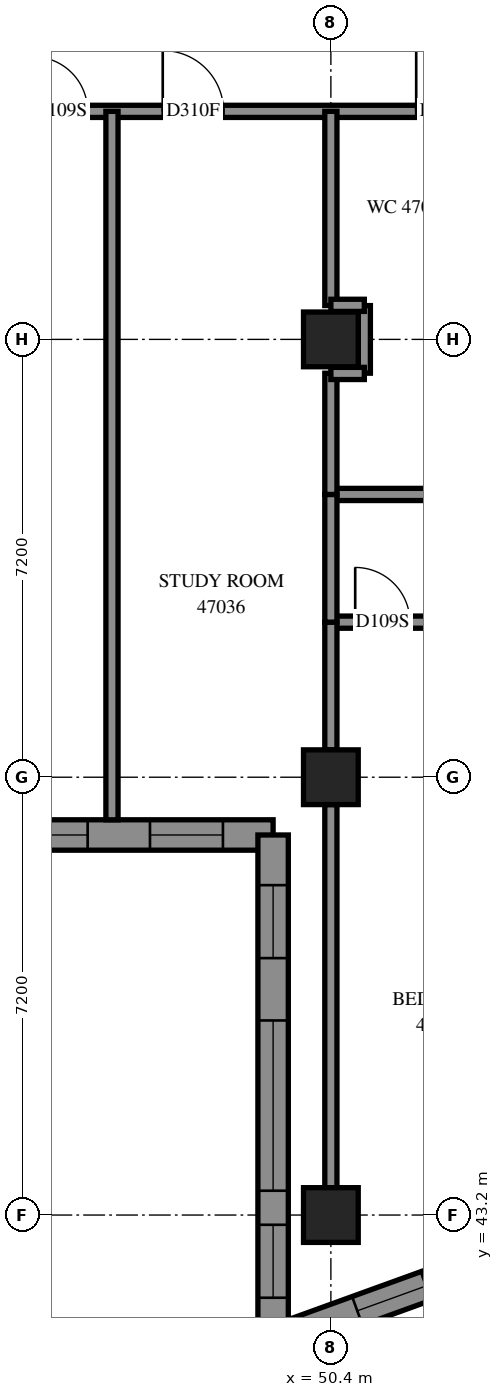
"""IFC4 building model, lengths in metres.
Left out: names, types, materials, properties, quantities, classifications, styles, units other than length and angle.
Written with IfcOpenShell. Run it as: python <this file> out.ifc"""

import sys

from ifc_helpers import new_model, si_unit, direction, frame, frame_2d, origin, origin_2d, place, context, subcontext, project, spatial, polyline, rectangle, outline, extrude, element, fill, save


model = new_model("IFC4")
c1 = context("Model", 3, precision=1e-05, world=origin(), true_north=direction((0.0, 1.0)))
c2 = subcontext(c1, "Body", "Model", "MODEL_VIEW")
j1 = project(units=[si_unit("LENGTHUNIT", "METRE"), si_unit("PLANEANGLEUNIT", "RADIAN")], contexts=[c1])
p1 = place(None, origin())
s1 = spatial("IfcSite", under=j1, at=p1, CompositionType="ELEMENT")
p2 = place(p1, origin())
s2 = spatial("IfcBuilding", under=s1, at=p2, CompositionType="ELEMENT")
p3 = place(p2, frame((0.0, 0.0, 172.8)))
s3 = spatial("IfcBuildingStorey", under=s2, at=p3, CompositionType="ELEMENT", Elevation=172.8)
for number, where, z_axis, x_axis in (
    (1, (50.4, 43.2, 0.0), (0.0, 0.0, 1.0), (1.0, 0.0, 0.0)),
    (2, (50.4, 50.4, 0.0), (0.0, 0.0, 1.0), (1.0, 0.0, 0.0)),
    (3, (50.4, 57.6, 0.0), (0.0, 0.0, 1.0), (1.0, 0.0, 0.0)),
):
    element("IfcColumn", number, at=place(p3, frame(where, z_axis=z_axis, x_axis=x_axis)), inside=s3, PredefinedType="COLUMN", context=c2, shape_type="SweptSolid", body=[
        extrude(rectangle(XDim=0.9, YDim=0.9, at=origin_2d()), origin(), (0.0, 0.0, 1.0), 3.1),
    ])
p4 = place(p3, frame((42.25, 49.45, 0.0), z_axis=(0.0, 0.0, 1.0), x_axis=(1.0, 0.0, 0.0)))
e4 = element("IfcWall", 4, at=p4, inside=s3, PredefinedType="SOLIDWALL", context=c2, shape_type="SweptSolid", body=[
    extrude(outline(polyline([(-0.25, -0.25), (6.95, -0.25), (7.45, 0.25), (0.25, 0.25), (-0.25, -0.25)])), origin(), (0.0, 0.0, 1.0), 3.1),
])
p5 = place(p4, frame((1.35, 0.0, 0.45)))
e5 = element("IfcOpeningElement", 5, at=p5, cuts=e4, PredefinedType="OPENING", context=c2, shape_type="SweptSolid", body=[
    extrude(rectangle(XDim=2.8, YDim=2.5, at=frame_2d((1.4, 1.25))), frame((0.0, 0.26, 0.0), z_axis=(0.0, -1.0, 0.0), x_axis=(1.0, 0.0, 0.0)), (0.0, 0.0, 1.0), 0.52),
])
p6 = place(p4, frame((5.175, 0.0, 0.45)))
e6 = element("IfcOpeningElement", 6, at=p6, cuts=e4, PredefinedType="OPENING", context=c2, shape_type="SweptSolid", body=[
    extrude(rectangle(XDim=1.2, YDim=2.5, at=frame_2d((0.6, 1.25))), frame((0.0, 0.26, 0.0), z_axis=(0.0, -1.0, 0.0), x_axis=(1.0, 0.0, 0.0)), (0.0, 0.0, 1.0), 0.52),
])
p7 = place(p3, frame((49.45, 49.45, 0.0), z_axis=(0.0, 0.0, 1.0), x_axis=(0.0, -1.0, 0.0)))
e7 = element("IfcWall", 7, at=p7, inside=s3, PredefinedType="SOLIDWALL", context=c2, shape_type="SweptSolid", body=[
    extrude(outline(polyline([(0.25, -0.25), (8.683, -0.25), (7.97, 0.25), (-0.25, 0.25), (0.25, -0.25)])), origin(), (0.0, 0.0, 1.0), 3.1),
])
p8 = place(p7, frame((3.05, 0.0, 0.45)))
e8 = element("IfcOpeningElement", 8, at=p8, cuts=e7, PredefinedType="OPENING", context=c2, shape_type="SweptSolid", body=[
    extrude(rectangle(XDim=2.8, YDim=2.5, at=frame_2d((1.4, 1.25))), frame((0.0, 0.26, 0.0), z_axis=(0.0, -1.0, 0.0), x_axis=(1.0, 0.0, 0.0)), (0.0, 0.0, 1.0), 0.52),
])
p9 = place(p7, frame((0.825, 0.0, 0.45)))
e9 = element("IfcOpeningElement", 9, at=p9, cuts=e7, PredefinedType="OPENING", context=c2, shape_type="SweptSolid", body=[
    extrude(rectangle(XDim=1.2, YDim=2.5, at=frame_2d((0.6, 1.25))), frame((0.0, 0.26, 0.0), z_axis=(0.0, -1.0, 0.0), x_axis=(1.0, 0.0, 0.0)), (0.0, 0.0, 1.0), 0.52),
])
p10 = place(p7, frame((6.41, 0.0, 0.45)))
e10 = element("IfcOpeningElement", 10, at=p10, cuts=e7, PredefinedType="OPENING", context=c2, shape_type="SweptSolid", body=[
    extrude(rectangle(XDim=1.2, YDim=2.5, at=frame_2d((0.6, 1.25))), frame((0.0, 0.26, 0.0), z_axis=(0.0, -1.0, 0.0), x_axis=(1.0, 0.0, 0.0)), (0.0, 0.0, 1.0), 0.52),
])
p11 = place(p3, frame((49.45, 41.123, 0.0), z_axis=(0.0, 0.0, 1.0), x_axis=(0.9402933257, 0.3403651885, 0.0)))
e11 = element("IfcWall", 11, at=p11, inside=s3, PredefinedType="SOLIDWALL", context=c2, shape_type="SweptSolid", body=[
    extrude(outline(polyline([(-0.356, -0.25), (3.266, -0.25), (3.402, 0.25), (0.356, 0.25), (-0.356, -0.25)])), origin(), (0.0, 0.0, 1.0), 3.1),
])
p12 = place(p11, frame((1.472, 0.0, 0.45)))
e12 = element("IfcOpeningElement", 12, at=p12, cuts=e11, PredefinedType="OPENING", context=c2, shape_type="SweptSolid", body=[
    extrude(rectangle(XDim=1.2, YDim=2.5, at=frame_2d((0.6, 1.25))), frame((0.0, 0.26, 0.0), z_axis=(0.0, -1.0, 0.0), x_axis=(1.0, 0.0, 0.0)), (0.0, 0.0, 1.0), 0.52),
])
p13 = place(p3, frame((36.0, 61.35, 0.0), z_axis=(0.0, 0.0, 1.0), x_axis=(1.0, 0.0, 0.0)))
e13 = element("IfcWall", 13, at=p13, inside=s3, PredefinedType="PARTITIONING", context=c2, shape_type="SweptSolid", body=[
    extrude(rectangle(XDim=16.95, YDim=0.2, at=frame_2d((8.475, 0.0))), origin(), (0.0, 0.0, 1.0), 3.1),
])
p14 = place(p13, frame((2.3, 0.0, 0.0)))
e14 = element("IfcOpeningElement", 14, at=p14, cuts=e13, PredefinedType="OPENING", context=c2, shape_type="SweptSolid", body=[
    extrude(rectangle(XDim=0.9, YDim=2.1, at=frame_2d((0.45, 1.05))), frame((0.0, 0.11, 0.0), z_axis=(0.0, -1.0, 0.0), x_axis=(1.0, 0.0, 0.0)), (0.0, 0.0, 1.0), 0.22),
])
p15 = place(p13, frame((4.125, 0.0, 0.0)))
e15 = element("IfcOpeningElement", 15, at=p15, cuts=e13, PredefinedType="OPENING", context=c2, shape_type="SweptSolid", body=[
    extrude(rectangle(XDim=1.0, YDim=2.1, at=frame_2d((0.5, 1.05))), frame((0.0, 0.11, 0.0), z_axis=(0.0, -1.0, 0.0), x_axis=(1.0, 0.0, 0.0)), (0.0, 0.0, 1.0), 0.22),
])
p16 = place(p13, frame((9.5, 0.0, 0.0)))
e16 = element("IfcOpeningElement", 16, at=p16, cuts=e13, PredefinedType="OPENING", context=c2, shape_type="SweptSolid", body=[
    extrude(rectangle(XDim=0.9, YDim=2.1, at=frame_2d((0.45, 1.05))), frame((0.0, 0.11, 0.0), z_axis=(0.0, -1.0, 0.0), x_axis=(1.0, 0.0, 0.0)), (0.0, 0.0, 1.0), 0.22),
])
p17 = place(p13, frame((11.635, 0.0, 0.0)))
e17 = element("IfcOpeningElement", 17, at=p17, cuts=e13, PredefinedType="OPENING", context=c2, shape_type="SweptSolid", body=[
    extrude(rectangle(XDim=1.0, YDim=2.1, at=frame_2d((0.5, 1.05))), frame((0.0, 0.11, 0.0), z_axis=(0.0, -1.0, 0.0), x_axis=(1.0, 0.0, 0.0)), (0.0, 0.0, 1.0), 0.22),
])
p18 = place(p13, frame((15.803, 0.0, 0.0)))
e18 = element("IfcOpeningElement", 18, at=p18, cuts=e13, PredefinedType="OPENING", context=c2, shape_type="SweptSolid", body=[
    extrude(rectangle(XDim=1.0, YDim=2.1, at=frame_2d((0.5, 1.05))), frame((0.0, 0.11, 0.0), z_axis=(0.0, -1.0, 0.0), x_axis=(1.0, 0.0, 0.0)), (0.0, 0.0, 1.0), 0.22),
])
p19 = place(p3, frame((46.8, 49.7, 0.0), z_axis=(0.0, 0.0, 1.0), x_axis=(0.0, 1.0, 0.0)))
e19 = element("IfcWall", 19, at=p19, inside=s3, PredefinedType="PARTITIONING", context=c2, shape_type="SweptSolid", body=[
    extrude(rectangle(XDim=11.65, YDim=0.2, at=frame_2d((5.825, 0.0))), origin(), (0.0, 0.0, 1.0), 3.1),
])
p20 = place(p3, frame((50.4, 43.65, 0.0), z_axis=(0.0, 0.0, 1.0), x_axis=(0.0, 1.0, 0.0)))
e20 = element("IfcWall", 20, at=p20, inside=s3, PredefinedType="PARTITIONING", context=c2, shape_type="SweptSolid", body=[
    extrude(rectangle(XDim=6.3, YDim=0.2, at=frame_2d((3.15, 0.0))), origin(), (0.0, 0.0, 1.0), 2.6),
])
p21 = place(p3, frame((50.4, 52.95, 0.0), z_axis=(0.0, 0.0, 1.0), x_axis=(1.0, 0.0, 0.0)))
e21 = element("IfcWall", 21, at=p21, inside=s3, PredefinedType="PARTITIONING", context=c2, shape_type="SweptSolid", body=[
    extrude(rectangle(XDim=5.1, YDim=0.2, at=frame_2d((2.55, 0.0))), origin(), (0.0, 0.0, 1.0), 3.1),
])
p22 = place(p21, frame((0.4, 0.0, 0.0)))
e22 = element("IfcOpeningElement", 22, at=p22, cuts=e21, PredefinedType="OPENING", context=c2, shape_type="SweptSolid", body=[
    extrude(rectangle(XDim=0.9, YDim=2.1, at=frame_2d((0.45, 1.05))), frame((0.0, 0.11, 0.0), z_axis=(0.0, -1.0, 0.0), x_axis=(1.0, 0.0, 0.0)), (0.0, 0.0, 1.0), 0.22),
])
p23 = place(p21, frame((3.976, 0.0, 0.0)))
e23 = element("IfcOpeningElement", 23, at=p23, cuts=e21, PredefinedType="OPENING", context=c2, shape_type="SweptSolid", body=[
    extrude(rectangle(XDim=1.0, YDim=2.1, at=frame_2d((0.5, 1.05))), frame((0.0, 0.11, 0.0), z_axis=(0.0, -1.0, 0.0), x_axis=(1.0, 0.0, 0.0)), (0.0, 0.0, 1.0), 0.22),
])
p24 = place(p3, frame((50.4, 58.156, 0.0), z_axis=(0.0, 0.0, 1.0), x_axis=(0.0, 1.0, 0.0)))
e24 = element("IfcWall", 24, at=p24, inside=s3, PredefinedType="PARTITIONING", context=c2, shape_type="SweptSolid", body=[
    extrude(rectangle(XDim=3.194, YDim=0.2, at=frame_2d((1.597, 0.0))), origin(), (0.0, 0.0, 1.0), 3.1),
])
p25 = place(p3, frame((50.4, 55.05, 0.0), z_axis=(0.0, 0.0, 1.0), x_axis=(1.0, 0.0, 0.0)))
e25 = element("IfcWall", 25, at=p25, inside=s3, PredefinedType="PARTITIONING", context=c2, shape_type="SweptSolid", body=[
    extrude(rectangle(XDim=2.55, YDim=0.2, at=frame_2d((1.275, 0.0))), origin(), (0.0, 0.0, 1.0), 3.1),
])
for number, where, z_axis, x_axis in (
    (26, (50.4, 50.85, 0.0), (0.0, 0.0, 1.0), (0.0, 1.0, 0.0)),
    (27, (50.4, 52.95, 0.0), (0.0, 0.0, 1.0), (0.0, 1.0, 0.0)),
):
    element("IfcWall", number, at=place(p3, frame(where, z_axis=z_axis, x_axis=x_axis)), inside=s3, PredefinedType="PARTITIONING", context=c2, shape_type="SweptSolid", body=[
        extrude(rectangle(XDim=2.1, YDim=0.2, at=frame_2d((1.05, 0.0))), origin(), (0.0, 0.0, 1.0), 3.1),
    ])
p26 = place(p3, frame((50.4, 55.05, 0.0), z_axis=(0.0, 0.0, 1.0), x_axis=(0.0, 1.0, 0.0)))
e28 = element("IfcWall", 28, at=p26, inside=s3, PredefinedType="PARTITIONING", context=c2, shape_type="SweptSolid", body=[
    extrude(rectangle(XDim=1.994, YDim=0.2, at=frame_2d((0.997, 0.0))), origin(), (0.0, 0.0, 1.0), 3.1),
])
p27 = place(p3, frame((50.95, 57.044, 0.0), z_axis=(0.0, 0.0, 1.0), x_axis=(0.0, 1.0, 0.0)))
e29 = element("IfcWall", 29, at=p27, inside=s3, PredefinedType="PARTITIONING", context=c2, shape_type="SweptSolid", body=[
    extrude(rectangle(XDim=1.112, YDim=0.2, at=frame_2d((0.556, 0.0))), origin(), (0.0, 0.0, 1.0), 3.1),
])
for number, where, z_axis, x_axis in (
    (30, (50.4, 58.16, 0.0), (0.0, 0.0, 1.0), (1.0, 0.0, 0.0)),
    (31, (50.4, 57.04, 0.0), (0.0, 0.0, 1.0), (1.0, 0.0, 0.0)),
):
    element("IfcWall", number, at=place(p3, frame(where, z_axis=z_axis, x_axis=x_axis)), inside=s3, PredefinedType="PARTITIONING", context=c2, shape_type="SweptSolid", body=[
        extrude(rectangle(XDim=0.55, YDim=0.2, at=frame_2d((0.275, 0.0))), origin(), (0.0, 0.0, 1.0), 3.1),
    ])
p28 = place(p5, origin())
e32 = element("IfcWindow", 32, at=p28, inside=s3, PartitioningType="SINGLE_PANEL", PredefinedType="WINDOW", context=c2, shape_type="SweptSolid", body=[
    extrude(rectangle(XDim=2.8, YDim=2.5, at=frame_2d((1.4, 1.25))), frame((0.0, 0.18, 0.0), z_axis=(0.0, -1.0, 0.0), x_axis=(1.0, 0.0, 0.0)), (0.0, 0.0, 1.0), 0.06),
])
fill(e5, e32)
p29 = place(p6, origin())
e33 = element("IfcWindow", 33, at=p29, inside=s3, PartitioningType="SINGLE_PANEL", PredefinedType="WINDOW", context=c2, shape_type="SweptSolid", body=[
    extrude(rectangle(XDim=1.2, YDim=2.5, at=frame_2d((0.6, 1.25))), frame((0.0, 0.18, 0.0), z_axis=(0.0, -1.0, 0.0), x_axis=(1.0, 0.0, 0.0)), (0.0, 0.0, 1.0), 0.06),
])
fill(e6, e33)
p30 = place(p8, origin())
e34 = element("IfcWindow", 34, at=p30, inside=s3, PartitioningType="SINGLE_PANEL", PredefinedType="WINDOW", context=c2, shape_type="SweptSolid", body=[
    extrude(rectangle(XDim=2.8, YDim=2.5, at=frame_2d((1.4, 1.25))), frame((0.0, 0.18, 0.0), z_axis=(0.0, -1.0, 0.0), x_axis=(1.0, 0.0, 0.0)), (0.0, 0.0, 1.0), 0.06),
])
fill(e8, e34)
p31 = place(p9, origin())
e35 = element("IfcWindow", 35, at=p31, inside=s3, PartitioningType="SINGLE_PANEL", PredefinedType="WINDOW", context=c2, shape_type="SweptSolid", body=[
    extrude(rectangle(XDim=1.2, YDim=2.5, at=frame_2d((0.6, 1.25))), frame((0.0, 0.18, 0.0), z_axis=(0.0, -1.0, 0.0), x_axis=(1.0, 0.0, 0.0)), (0.0, 0.0, 1.0), 0.06),
])
fill(e9, e35)
p32 = place(p10, origin())
e36 = element("IfcWindow", 36, at=p32, inside=s3, PartitioningType="SINGLE_PANEL", PredefinedType="WINDOW", context=c2, shape_type="SweptSolid", body=[
    extrude(rectangle(XDim=1.2, YDim=2.5, at=frame_2d((0.6, 1.25))), frame((0.0, 0.18, 0.0), z_axis=(0.0, -1.0, 0.0), x_axis=(1.0, 0.0, 0.0)), (0.0, 0.0, 1.0), 0.06),
])
fill(e10, e36)
p33 = place(p12, origin())
e37 = element("IfcWindow", 37, at=p33, inside=s3, PartitioningType="SINGLE_PANEL", PredefinedType="WINDOW", context=c2, shape_type="SweptSolid", body=[
    extrude(rectangle(XDim=1.2, YDim=2.5, at=frame_2d((0.6, 1.25))), frame((0.0, 0.18, 0.0), z_axis=(0.0, -1.0, 0.0), x_axis=(1.0, 0.0, 0.0)), (0.0, 0.0, 1.0), 0.06),
])
fill(e12, e37)
p34 = place(p16, origin())
e38 = element("IfcDoor", 38, at=p34, inside=s3, OperationType="SINGLE_SWING_LEFT", PredefinedType="DOOR", context=c2, shape_type="SweptSolid", body=[
    extrude(rectangle(XDim=0.9, YDim=2.1, at=frame_2d((0.45, 1.05))), frame((0.0, 0.025, 0.0), z_axis=(0.0, -1.0, 0.0), x_axis=(1.0, 0.0, 0.0)), (0.0, 0.0, 1.0), 0.05),
])
fill(e16, e38)
p35 = place(p17, origin())
e39 = element("IfcDoor", 39, at=p35, inside=s3, OperationType="SINGLE_SWING_RIGHT", PredefinedType="DOOR", context=c2, shape_type="SweptSolid", body=[
    extrude(rectangle(XDim=1.0, YDim=2.1, at=frame_2d((0.5, 1.05))), frame((0.0, 0.025, 0.0), z_axis=(0.0, -1.0, 0.0), x_axis=(1.0, 0.0, 0.0)), (0.0, 0.0, 1.0), 0.05),
])
fill(e17, e39)
p36 = place(p18, origin())
e40 = element("IfcDoor", 40, at=p36, inside=s3, OperationType="SINGLE_SWING_LEFT", PredefinedType="DOOR", context=c2, shape_type="SweptSolid", body=[
    extrude(rectangle(XDim=1.0, YDim=2.1, at=frame_2d((0.5, 1.05))), frame((0.0, 0.025, 0.0), z_axis=(0.0, -1.0, 0.0), x_axis=(1.0, 0.0, 0.0)), (0.0, 0.0, 1.0), 0.05),
])
fill(e18, e40)
p37 = place(p22, origin())
e41 = element("IfcDoor", 41, at=p37, inside=s3, OperationType="SINGLE_SWING_LEFT", PredefinedType="DOOR", context=c2, shape_type="SweptSolid", body=[
    extrude(rectangle(XDim=0.9, YDim=2.1, at=frame_2d((0.45, 1.05))), frame((0.0, 0.025, 0.0), z_axis=(0.0, -1.0, 0.0), x_axis=(1.0, 0.0, 0.0)), (0.0, 0.0, 1.0), 0.05),
])
fill(e22, e41)
save(model, sys.argv[1])
